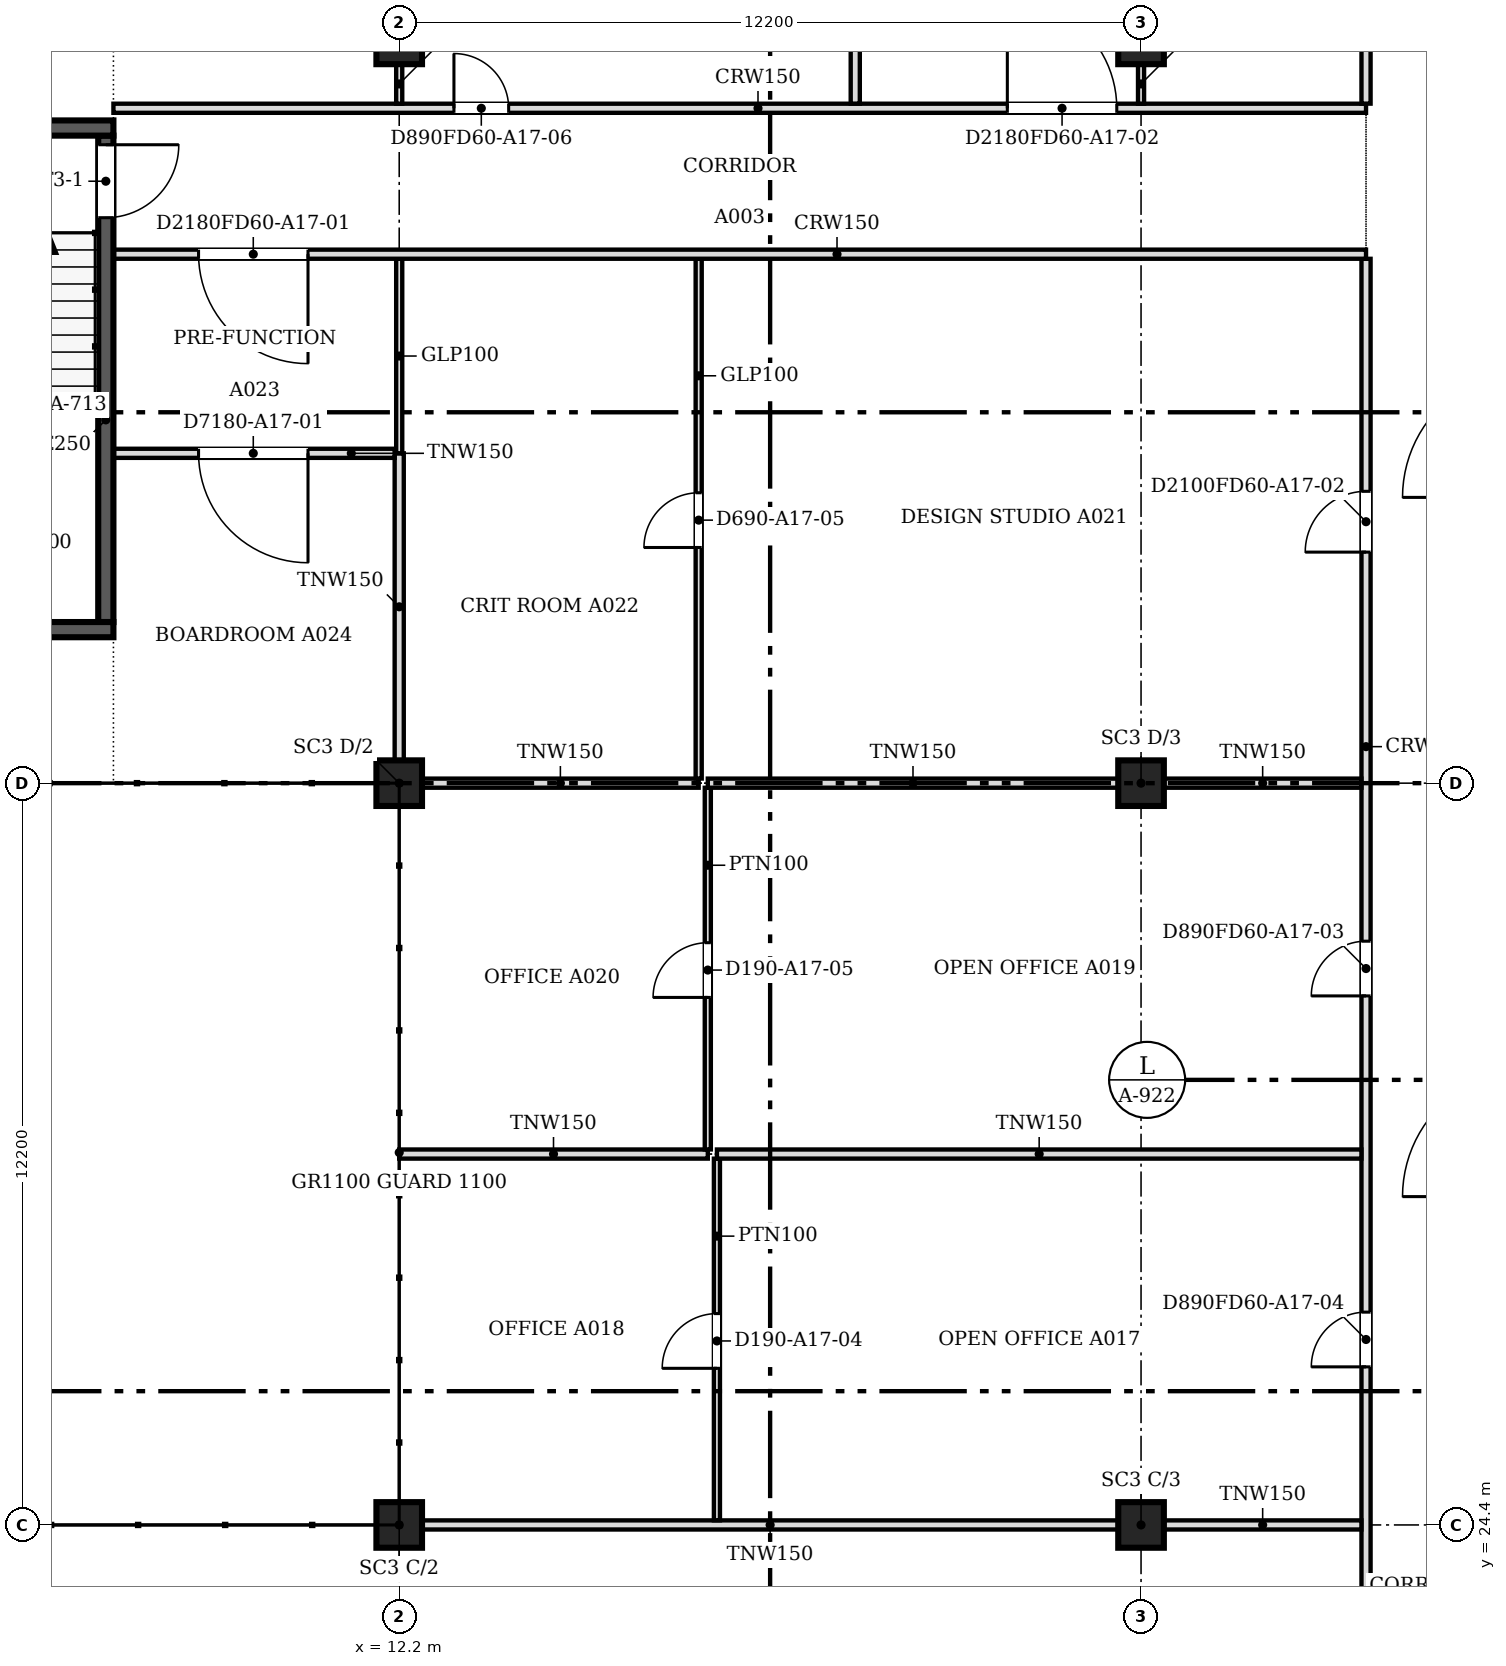
"""IFC4 building model, lengths in metres.
Left out: names, types, materials, properties, quantities, classifications, styles, units other than length and angle.
Written with IfcOpenShell. Run it as: python <this file> out.ifc"""

import sys

from ifc_helpers import new_model, si_unit, direction, frame, frame_2d, origin, origin_2d, place, context, subcontext, project, spatial, rectangle, extrude, source, transform, mapped, element, fill, save


model = new_model("IFC4")
c1 = context("Model", 3, precision=1e-05, world=origin(), true_north=direction((0.0, 1.0)))
c2 = subcontext(c1, "Body", "Model", "MODEL_VIEW")
j1 = project(units=[si_unit("LENGTHUNIT", "METRE"), si_unit("PLANEANGLEUNIT", "RADIAN")], contexts=[c1])
p1 = place(None, origin())
s1 = spatial("IfcSite", under=j1, at=p1, CompositionType="ELEMENT")
p2 = place(p1, origin())
s2 = spatial("IfcBuilding", under=s1, at=p2, CompositionType="ELEMENT")
p3 = place(p2, frame((0.0, 0.0, 185.8)))
s3 = spatial("IfcBuildingStorey", under=s2, at=p3, CompositionType="ELEMENT", Elevation=185.8)
for number, where, z_axis, x_axis in (
    (1, (12.2, 24.4, 0.0), (0.0, 0.0, 1.0), (1.0, 0.0, 0.0)),
    (2, (12.2, 36.6, 0.0), (0.0, 0.0, 1.0), (1.0, 0.0, 0.0)),
    (3, (12.2, 48.8, 0.0), (0.0, 0.0, 1.0), (1.0, 0.0, 0.0)),
    (4, (24.4, 24.4, 0.0), (0.0, 0.0, 1.0), (1.0, 0.0, 0.0)),
    (5, (24.4, 36.6, 0.0), (0.0, 0.0, 1.0), (1.0, 0.0, 0.0)),
    (6, (24.4, 48.8, 0.0), (0.0, 0.0, 1.0), (1.0, 0.0, 0.0)),
):
    element("IfcColumn", number, at=place(p3, frame(where, z_axis=z_axis, x_axis=x_axis)), inside=s3, PredefinedType="COLUMN", context=c2, shape_type="SweptSolid", body=[
        extrude(rectangle(XDim=0.75, YDim=0.75, at=origin_2d()), origin(), (0.0, 0.0, 1.0), 3.6),
    ])
for number, where, z_axis, x_axis in (
    (7, (7.5, 39.125, 0.0), (0.0, 0.0, 1.0), (-1.0, 0.0, 0.0)),
    (8, (3.6, 47.375, 0.0), (0.0, 0.0, 1.0), (1.0, 0.0, 0.0)),
):
    element("IfcWall", number, at=place(p3, frame(where, z_axis=z_axis, x_axis=x_axis)), inside=s3, PredefinedType="SOLIDWALL", context=c2, shape_type="SweptSolid", body=[
        extrude(rectangle(XDim=3.9, YDim=0.25, at=frame_2d((1.95, 0.0))), origin(), (0.0, 0.0, 1.0), 3.8),
    ])
p4 = place(p3, frame((7.375, 47.25, 0.0), z_axis=(0.0, 0.0, 1.0), x_axis=(0.0, -1.0, 0.0)))
e9 = element("IfcWall", 9, at=p4, inside=s3, PredefinedType="SOLIDWALL", context=c2, shape_type="SweptSolid", body=[
    extrude(rectangle(XDim=8.0, YDim=0.25, at=frame_2d((4.0, 0.0))), origin(), (0.0, 0.0, 1.0), 3.8),
])
m1 = source(origin(), c2, "Body", "SweptSolid", [
    extrude(rectangle(XDim=1.2, YDim=2.1, at=frame_2d((0.6, 1.05))), frame((0.0, 0.135, 0.0), z_axis=(0.0, -1.0, 0.0), x_axis=(1.0, 0.0, 0.0)), (0.0, 0.0, 1.0), 0.27),
])
p5 = place(p4, frame((0.15, 0.0, 0.0)))
e10 = element("IfcOpeningElement", 10, at=p5, cuts=e9, PredefinedType="OPENING", context=c2, shape_type="MappedRepresentation", body=[
    mapped(m1, transform((0.0, 0.0, 0.0), scale=1.0)),
])
p6 = place(p3, frame((28.1, 18.8, 0.0), z_axis=(0.0, 0.0, 1.0), x_axis=(0.0, 1.0, 0.0)))
e11 = element("IfcWall", 11, at=p6, inside=s3, PredefinedType="PARTITIONING", context=c2, shape_type="SweptSolid", body=[
    extrude(rectangle(XDim=26.424, YDim=0.15, at=frame_2d((13.212, 0.0))), origin(), (0.0, 0.0, 1.0), 3.067),
])
m2 = source(origin(), c2, "Body", "SweptSolid", [
    extrude(rectangle(XDim=0.9, YDim=2.1, at=frame_2d((0.45, 1.05))), frame((0.0, 0.085, 0.0), z_axis=(0.0, -1.0, 0.0), x_axis=(1.0, 0.0, 0.0)), (0.0, 0.0, 1.0), 0.17),
])
p7 = place(p6, frame((1.1, 0.0, 0.0)))
e12 = element("IfcOpeningElement", 12, at=p7, cuts=e11, PredefinedType="OPENING", context=c2, shape_type="MappedRepresentation", body=[
    mapped(m2, transform((0.0, 0.0, 0.0), scale=1.0)),
])
p8 = place(p6, frame((14.301, 0.0, 0.0)))
e13 = element("IfcOpeningElement", 13, at=p8, cuts=e11, PredefinedType="OPENING", context=c2, shape_type="MappedRepresentation", body=[
    mapped(m2, transform((0.0, 0.0, 0.0), scale=1.0)),
])
p9 = place(p6, frame((8.2, 0.0, 0.0)))
e14 = element("IfcOpeningElement", 14, at=p9, cuts=e11, PredefinedType="OPENING", context=c2, shape_type="MappedRepresentation", body=[
    mapped(m2, transform((0.0, 0.0, 0.0), scale=1.0)),
])
m3 = source(origin(), c2, "Body", "SweptSolid", [
    extrude(rectangle(XDim=1.0, YDim=2.1, at=frame_2d((0.5, 1.05))), frame((0.0, 0.085, 0.0), z_axis=(0.0, -1.0, 0.0), x_axis=(1.0, 0.0, 0.0)), (0.0, 0.0, 1.0), 0.17),
])
p10 = place(p6, frame((21.6, 0.0, 0.0)))
e15 = element("IfcOpeningElement", 15, at=p10, cuts=e11, PredefinedType="OPENING", context=c2, shape_type="MappedRepresentation", body=[
    mapped(m3, transform((0.0, 0.0, 0.0), scale=1.0)),
])
p11 = place(p3, frame((12.576, 24.4, 0.0), z_axis=(0.0, 0.0, 1.0), x_axis=(1.0, 0.0, 0.0)))
e16 = element("IfcWall", 16, at=p11, inside=s3, PredefinedType="PARTITIONING", context=c2, shape_type="SweptSolid", body=[
    extrude(rectangle(XDim=11.448, YDim=0.15, at=frame_2d((5.724, 0.0))), origin(), (0.0, 0.0, 1.0), 3.067),
])
p12 = place(p3, frame((24.776, 24.4, 0.0), z_axis=(0.0, 0.0, 1.0), x_axis=(1.0, 0.0, 0.0)))
e17 = element("IfcWall", 17, at=p12, inside=s3, PredefinedType="PARTITIONING", context=c2, shape_type="SweptSolid", body=[
    extrude(rectangle(XDim=3.248, YDim=0.15, at=frame_2d((1.624, 0.0))), origin(), (0.0, 0.0, 1.0), 3.067),
])
p13 = place(p3, frame((17.425, 24.476, 0.0), z_axis=(0.0, 0.0, 1.0), x_axis=(0.0, 1.0, 0.0)))
e18 = element("IfcWall", 18, at=p13, inside=s3, PredefinedType="PARTITIONING", context=c2, shape_type="SweptSolid", body=[
    extrude(rectangle(XDim=5.948, YDim=0.1, at=frame_2d((2.974, 0.0))), origin(), (0.0, 0.0, 1.0), 3.067),
])
m4 = source(origin(), c2, "Body", "SweptSolid", [
    extrude(rectangle(XDim=0.9, YDim=2.1, at=frame_2d((0.45, 1.05))), frame((0.0, 0.06, 0.0), z_axis=(0.0, -1.0, 0.0), x_axis=(1.0, 0.0, 0.0)), (0.0, 0.0, 1.0), 0.12),
])
p14 = place(p13, frame((2.5, 0.0, 0.0)))
e19 = element("IfcOpeningElement", 19, at=p14, cuts=e18, PredefinedType="OPENING", context=c2, shape_type="MappedRepresentation", body=[
    mapped(m4, transform((0.0, 0.0, 0.0), scale=1.0)),
])
p15 = place(p3, frame((12.2, 30.5, 0.0), z_axis=(0.0, 0.0, 1.0), x_axis=(1.0, 0.0, 0.0)))
e20 = element("IfcWall", 20, at=p15, inside=s3, PredefinedType="PARTITIONING", context=c2, shape_type="SweptSolid", body=[
    extrude(rectangle(XDim=5.075, YDim=0.15, at=frame_2d((2.538, 0.0))), origin(), (0.0, 0.0, 1.0), 3.067),
])
p16 = place(p3, frame((17.425, 30.5, 0.0), z_axis=(0.0, 0.0, 1.0), x_axis=(1.0, 0.0, 0.0)))
e21 = element("IfcWall", 21, at=p16, inside=s3, PredefinedType="PARTITIONING", context=c2, shape_type="SweptSolid", body=[
    extrude(rectangle(XDim=10.599, YDim=0.15, at=frame_2d((5.299, 0.0))), origin(), (0.0, 0.0, 1.0), 3.067),
])
p17 = place(p3, frame((17.275, 30.576, 0.0), z_axis=(0.0, 0.0, 1.0), x_axis=(0.0, 1.0, 0.0)))
e22 = element("IfcWall", 22, at=p17, inside=s3, PredefinedType="PARTITIONING", context=c2, shape_type="SweptSolid", body=[
    extrude(rectangle(XDim=5.948, YDim=0.1, at=frame_2d((2.974, 0.0))), origin(), (0.0, 0.0, 1.0), 3.067),
])
p18 = place(p17, frame((2.5, 0.0, 0.0)))
e23 = element("IfcOpeningElement", 23, at=p18, cuts=e22, PredefinedType="OPENING", context=c2, shape_type="MappedRepresentation", body=[
    mapped(m4, transform((0.0, 0.0, 0.0), scale=1.0)),
])
p19 = place(p3, frame((12.576, 36.6, 0.0), z_axis=(0.0, 0.0, 1.0), x_axis=(1.0, 0.0, 0.0)))
e24 = element("IfcWall", 24, at=p19, inside=s3, PredefinedType="PARTITIONING", context=c2, shape_type="SweptSolid", body=[
    extrude(rectangle(XDim=4.549, YDim=0.15, at=frame_2d((2.274, 0.0))), origin(), (0.0, 0.0, 1.0), 3.067),
])
p20 = place(p3, frame((17.275, 36.6, 0.0), z_axis=(0.0, 0.0, 1.0), x_axis=(1.0, 0.0, 0.0)))
e25 = element("IfcWall", 25, at=p20, inside=s3, PredefinedType="PARTITIONING", context=c2, shape_type="SweptSolid", body=[
    extrude(rectangle(XDim=6.749, YDim=0.15, at=frame_2d((3.375, 0.0))), origin(), (0.0, 0.0, 1.0), 3.067),
])
p21 = place(p3, frame((24.776, 36.6, 0.0), z_axis=(0.0, 0.0, 1.0), x_axis=(1.0, 0.0, 0.0)))
e26 = element("IfcWall", 26, at=p21, inside=s3, PredefinedType="PARTITIONING", context=c2, shape_type="SweptSolid", body=[
    extrude(rectangle(XDim=3.248, YDim=0.15, at=frame_2d((1.624, 0.0))), origin(), (0.0, 0.0, 1.0), 3.067),
])
p22 = place(p3, frame((17.125, 36.676, 0.0), z_axis=(0.0, 0.0, 1.0), x_axis=(0.0, 1.0, 0.0)))
e27 = element("IfcWall", 27, at=p22, inside=s3, PredefinedType="PARTITIONING", context=c2, shape_type="SweptSolid", body=[
    extrude(rectangle(XDim=8.548, YDim=0.1, at=frame_2d((4.274, 0.0))), origin(), (0.0, 0.0, 1.0), 3.067),
])
p23 = place(p22, frame((3.8, 0.0, 0.0)))
e28 = element("IfcOpeningElement", 28, at=p23, cuts=e27, PredefinedType="OPENING", context=c2, shape_type="MappedRepresentation", body=[
    mapped(m4, transform((0.0, 0.0, 0.0), scale=1.0)),
])
p24 = place(p3, frame((12.2, 36.976, 0.0), z_axis=(0.0, 0.0, 1.0), x_axis=(0.0, 1.0, 0.0)))
e29 = element("IfcWall", 29, at=p24, inside=s3, PredefinedType="PARTITIONING", context=c2, shape_type="SweptSolid", body=[
    extrude(rectangle(XDim=5.049, YDim=0.15, at=frame_2d((2.524, 0.0))), origin(), (0.0, 0.0, 1.0), 3.067),
])
p25 = place(p3, frame((12.124, 42.025, 0.0), z_axis=(0.0, 0.0, 1.0), x_axis=(-1.0, 0.0, 0.0)))
e30 = element("IfcWall", 30, at=p25, inside=s3, PredefinedType="PARTITIONING", context=c2, shape_type="SweptSolid", body=[
    extrude(rectangle(XDim=4.624, YDim=0.15, at=frame_2d((2.312, 0.0))), origin(), (0.0, 0.0, 1.0), 3.067),
])
m5 = source(origin(), c2, "Body", "SweptSolid", [
    extrude(rectangle(XDim=1.8, YDim=2.1, at=frame_2d((0.9, 1.05))), frame((0.0, 0.085, 0.0), z_axis=(0.0, -1.0, 0.0), x_axis=(1.0, 0.0, 0.0)), (0.0, 0.0, 1.0), 0.17),
])
p26 = place(p25, frame((1.424, 0.0, 0.0)))
e31 = element("IfcOpeningElement", 31, at=p26, cuts=e30, PredefinedType="OPENING", context=c2, shape_type="MappedRepresentation", body=[
    mapped(m5, transform((0.0, 0.0, 0.0), scale=1.0)),
])
p27 = place(p3, frame((12.2, 42.026, 0.0), z_axis=(0.0, 0.0, 1.0), x_axis=(0.0, 1.0, 0.0)))
e32 = element("IfcWall", 32, at=p27, inside=s3, PredefinedType="PARTITIONING", context=c2, shape_type="SweptSolid", body=[
    extrude(rectangle(XDim=3.198, YDim=0.1, at=frame_2d((1.599, 0.0))), origin(), (0.0, 0.0, 1.0), 3.067),
])
p28 = place(p3, frame((28.1, 45.3, 0.0), z_axis=(0.0, 0.0, 1.0), x_axis=(-1.0, 0.0, 0.0)))
e33 = element("IfcWall", 33, at=p28, inside=s3, PredefinedType="PARTITIONING", context=c2, shape_type="SweptSolid", body=[
    extrude(rectangle(XDim=20.6, YDim=0.15, at=frame_2d((10.3, 0.0))), origin(), (0.0, 0.0, 1.0), 3.067),
])
p29 = place(p28, frame((17.4, 0.0, 0.0)))
e34 = element("IfcOpeningElement", 34, at=p29, cuts=e33, PredefinedType="OPENING", context=c2, shape_type="MappedRepresentation", body=[
    mapped(m5, transform((0.0, 0.0, 0.0), scale=1.0)),
])
p30 = place(p3, frame((7.5, 47.7, 0.0), z_axis=(0.0, 0.0, 1.0), x_axis=(1.0, 0.0, 0.0)))
e35 = element("IfcWall", 35, at=p30, inside=s3, PredefinedType="PARTITIONING", context=c2, shape_type="SweptSolid", body=[
    extrude(rectangle(XDim=20.6, YDim=0.15, at=frame_2d((10.3, 0.0))), origin(), (0.0, 0.0, 1.0), 3.067),
])
p31 = place(p30, frame((14.701, 0.0, 0.0)))
e36 = element("IfcOpeningElement", 36, at=p31, cuts=e35, PredefinedType="OPENING", context=c2, shape_type="MappedRepresentation", body=[
    mapped(m5, transform((0.0, 0.0, 0.0), scale=1.0)),
])
p32 = place(p30, frame((5.6, 0.0, 0.0)))
e37 = element("IfcOpeningElement", 37, at=p32, cuts=e35, PredefinedType="OPENING", context=c2, shape_type="MappedRepresentation", body=[
    mapped(m2, transform((0.0, 0.0, 0.0), scale=1.0)),
])
p33 = place(p3, frame((19.7, 47.776, 0.0), z_axis=(0.0, 0.0, 1.0), x_axis=(0.0, 1.0, 0.0)))
e38 = element("IfcWall", 38, at=p33, inside=s3, PredefinedType="PARTITIONING", context=c2, shape_type="SweptSolid", body=[
    extrude(rectangle(XDim=3.324, YDim=0.15, at=frame_2d((1.662, 0.0))), origin(), (0.0, 0.0, 1.0), 3.067),
])
p34 = place(p3, frame((28.1, 47.776, 0.0), z_axis=(0.0, 0.0, 1.0), x_axis=(0.0, 1.0, 0.0)))
e39 = element("IfcWall", 39, at=p34, inside=s3, PredefinedType="PARTITIONING", context=c2, shape_type="SweptSolid", body=[
    extrude(rectangle(XDim=3.348, YDim=0.15, at=frame_2d((1.674, 0.0))), origin(), (0.0, 0.0, 1.0), 3.067),
])
for number, where, z_axis, x_axis in (
    (40, (12.2, 48.425, 0.0), (0.0, 0.0, 1.0), (0.0, -1.0, 0.0)),
    (41, (24.4, 48.425, 0.0), (0.0, 0.0, 1.0), (0.0, -1.0, 0.0)),
):
    element("IfcWall", number, at=place(p3, frame(where, z_axis=z_axis, x_axis=x_axis)), inside=s3, PredefinedType="PARTITIONING", context=c2, shape_type="SweptSolid", body=[
        extrude(rectangle(XDim=0.65, YDim=0.1, at=frame_2d((0.325, 0.0))), origin(), (0.0, 0.0, 1.0), 3.067),
    ])
m6 = source(origin(), c2, "Body", "SweptSolid", [
    extrude(rectangle(XDim=1.2, YDim=2.1, at=frame_2d((0.6, 1.05))), frame((0.0, 0.025, 0.0), z_axis=(0.0, -1.0, 0.0), x_axis=(1.0, 0.0, 0.0)), (0.0, 0.0, 1.0), 0.05),
])
p35 = place(p5, origin())
e42 = element("IfcDoor", 42, at=p35, inside=s3, OperationType="SINGLE_SWING_LEFT", PredefinedType="DOOR", context=c2, shape_type="MappedRepresentation", body=[
    mapped(m6, transform((0.0, 0.0, 0.0), scale=1.0)),
])
fill(e10, e42)
m7 = source(origin(), c2, "Body", "SweptSolid", [
    extrude(rectangle(XDim=1.8, YDim=2.1, at=frame_2d((0.9, 1.05))), frame((0.0, 0.025, 0.0), z_axis=(0.0, -1.0, 0.0), x_axis=(1.0, 0.0, 0.0)), (0.0, 0.0, 1.0), 0.05),
])
p36 = place(p26, origin())
e43 = element("IfcDoor", 43, at=p36, inside=s3, OperationType="DOUBLE_DOOR_SINGLE_SWING", PredefinedType="DOOR", context=c2, shape_type="MappedRepresentation", body=[
    mapped(m7, transform((0.0, 0.0, 0.0), scale=1.0)),
])
fill(e31, e43)
p37 = place(p29, origin())
e44 = element("IfcDoor", 44, at=p37, inside=s3, OperationType="DOUBLE_DOOR_SINGLE_SWING", PredefinedType="DOOR", context=c2, shape_type="MappedRepresentation", body=[
    mapped(m7, transform((0.0, 0.0, 0.0), scale=1.0)),
])
fill(e34, e44)
m8 = source(origin(), c2, "Body", "SweptSolid", [
    extrude(rectangle(XDim=0.9, YDim=2.1, at=frame_2d((0.45, 1.05))), frame((0.0, 0.025, 0.0), z_axis=(0.0, -1.0, 0.0), x_axis=(1.0, 0.0, 0.0)), (0.0, 0.0, 1.0), 0.05),
])
p38 = place(p14, origin())
e45 = element("IfcDoor", 45, at=p38, inside=s3, OperationType="SINGLE_SWING_LEFT", PredefinedType="DOOR", context=c2, shape_type="MappedRepresentation", body=[
    mapped(m8, transform((0.0, 0.0, 0.0), scale=1.0)),
])
fill(e19, e45)
p39 = place(p18, origin())
e46 = element("IfcDoor", 46, at=p39, inside=s3, OperationType="SINGLE_SWING_LEFT", PredefinedType="DOOR", context=c2, shape_type="MappedRepresentation", body=[
    mapped(m8, transform((0.0, 0.0, 0.0), scale=1.0)),
])
fill(e23, e46)
p40 = place(p8, origin())
e47 = element("IfcDoor", 47, at=p40, inside=s3, OperationType="SINGLE_SWING_LEFT", PredefinedType="DOOR", context=c2, shape_type="MappedRepresentation", body=[
    mapped(m8, transform((0.0, 0.0, 0.0), scale=1.0)),
])
fill(e13, e47)
p41 = place(p9, origin())
e48 = element("IfcDoor", 48, at=p41, inside=s3, OperationType="SINGLE_SWING_LEFT", PredefinedType="DOOR", context=c2, shape_type="MappedRepresentation", body=[
    mapped(m8, transform((0.0, 0.0, 0.0), scale=1.0)),
])
fill(e14, e48)
p42 = place(p31, origin())
e49 = element("IfcDoor", 49, at=p42, inside=s3, OperationType="DOUBLE_DOOR_SINGLE_SWING", PredefinedType="DOOR", context=c2, shape_type="MappedRepresentation", body=[
    mapped(m7, transform((0.0, 0.0, 0.0), scale=1.0)),
])
fill(e36, e49)
p43 = place(p23, origin())
e50 = element("IfcDoor", 50, at=p43, inside=s3, OperationType="SINGLE_SWING_LEFT", PredefinedType="DOOR", context=c2, shape_type="MappedRepresentation", body=[
    mapped(m8, transform((0.0, 0.0, 0.0), scale=1.0)),
])
fill(e28, e50)
m9 = source(origin(), c2, "Body", "SweptSolid", [
    extrude(rectangle(XDim=1.0, YDim=2.1, at=frame_2d((0.5, 1.05))), frame((0.0, 0.025, 0.0), z_axis=(0.0, -1.0, 0.0), x_axis=(1.0, 0.0, 0.0)), (0.0, 0.0, 1.0), 0.05),
])
p44 = place(p10, origin())
e51 = element("IfcDoor", 51, at=p44, inside=s3, OperationType="SINGLE_SWING_LEFT", PredefinedType="DOOR", context=c2, shape_type="MappedRepresentation", body=[
    mapped(m9, transform((0.0, 0.0, 0.0), scale=1.0)),
])
fill(e15, e51)
p45 = place(p32, origin())
e52 = element("IfcDoor", 52, at=p45, inside=s3, OperationType="SINGLE_SWING_LEFT", PredefinedType="DOOR", context=c2, shape_type="MappedRepresentation", body=[
    mapped(m8, transform((0.0, 0.0, 0.0), scale=1.0)),
])
fill(e37, e52)
save(model, sys.argv[1])
